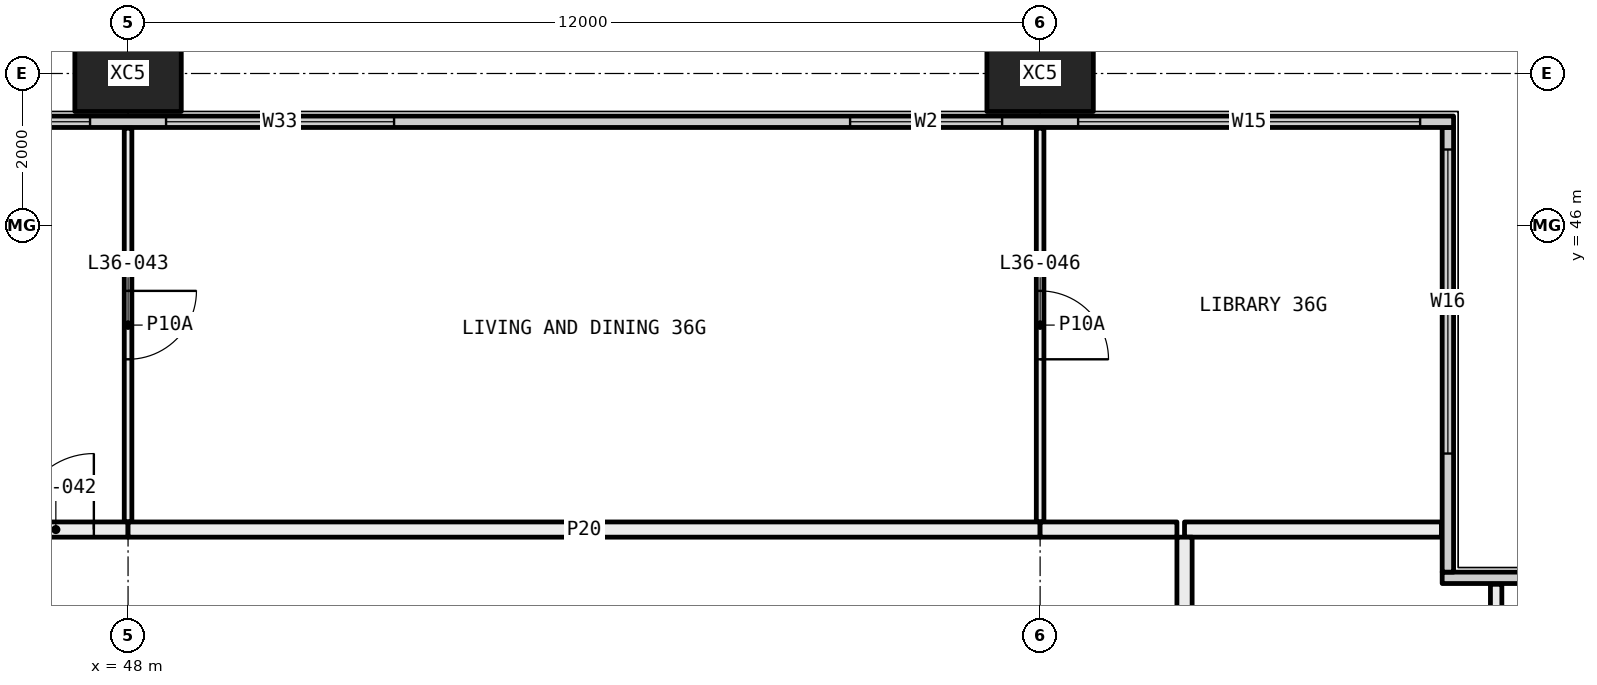
"""IFC4 building model, lengths in metres.
Left out: names, types, materials, properties, quantities, classifications, styles, units other than length and angle.
Written with IfcOpenShell. Run it as: python <this file> out.ifc"""

import sys

from ifc_helpers import new_model, si_unit, direction, frame, frame_2d, origin, origin_2d, place, context, subcontext, project, spatial, rectangle, hollow_rectangle, extrude, element, fill, save


model = new_model("IFC4")
c1 = context("Model", 3, precision=1e-05, world=origin(), true_north=direction((0.0, 1.0)))
c2 = subcontext(c1, "Body", "Model", "MODEL_VIEW")
j1 = project(units=[si_unit("LENGTHUNIT", "METRE"), si_unit("PLANEANGLEUNIT", "RADIAN")], contexts=[c1])
p1 = place(None, origin())
s1 = spatial("IfcSite", under=j1, at=p1, CompositionType="ELEMENT")
p2 = place(p1, origin())
s2 = spatial("IfcBuilding", under=s1, at=p2, CompositionType="ELEMENT")
p3 = place(p2, frame((0.0, 0.0, 138.0)))
s3 = spatial("IfcBuildingStorey", under=s2, at=p3, CompositionType="ELEMENT", Elevation=138.0)
for number, where, z_axis, x_axis in (
    (1, (48.0, 48.0, -0.4), (0.0, 0.0, 1.0), (1.0, 0.0, 0.0)),
    (2, (60.0, 48.0, -0.4), (0.0, 0.0, 1.0), (1.0, 0.0, 0.0)),
):
    element("IfcColumn", number, at=place(p3, frame(where, z_axis=z_axis, x_axis=x_axis)), inside=s3, PredefinedType="COLUMN", context=c2, shape_type="SweptSolid", body=[
        extrude(hollow_rectangle(XDim=1.4, YDim=1.0, WallThickness=0.055, at=origin_2d()), origin(), (0.0, 0.0, 1.0), 3.45),
    ])
p4 = place(p3, frame((65.29, 41.365, 0.0), z_axis=(0.0, 0.0, 1.0), x_axis=(1.0, 0.0, 0.0)))
e3 = element("IfcWall", 3, at=p4, inside=s3, PredefinedType="ELEMENTEDWALL", context=c2, shape_type="SweptSolid", body=[
    extrude(rectangle(XDim=6.15, YDim=0.15, at=frame_2d((3.075, 0.0))), origin(), (0.0, 0.0, 1.0), 3.05),
])
p5 = place(p4, frame((1.71, 0.0, 0.45)))
e4 = element("IfcOpeningElement", 4, at=p5, cuts=e3, PredefinedType="OPENING", context=c2, shape_type="SweptSolid", body=[
    extrude(rectangle(XDim=4.0, YDim=2.55, at=frame_2d((2.0, 1.275))), frame((0.0, 0.085, 0.0), z_axis=(0.0, -1.0, 0.0), x_axis=(1.0, 0.0, 0.0)), (0.0, 0.0, 1.0), 0.17),
])
p6 = place(p3, frame((65.365, 41.44, 0.0), z_axis=(0.0, 0.0, 1.0), x_axis=(0.0, 1.0, 0.0)))
e5 = element("IfcWall", 5, at=p6, inside=s3, PredefinedType="ELEMENTEDWALL", context=c2, shape_type="SweptSolid", body=[
    extrude(rectangle(XDim=5.85, YDim=0.15, at=frame_2d((2.925, 0.0))), origin(), (0.0, 0.0, 1.0), 3.05),
])
p7 = place(p6, frame((1.56, 0.0, 0.45)))
e6 = element("IfcOpeningElement", 6, at=p7, cuts=e5, PredefinedType="OPENING", context=c2, shape_type="SweptSolid", body=[
    extrude(rectangle(XDim=4.0, YDim=2.55, at=frame_2d((2.0, 1.275))), frame((0.0, 0.085, 0.0), z_axis=(0.0, -1.0, 0.0), x_axis=(1.0, 0.0, 0.0)), (0.0, 0.0, 1.0), 0.17),
])
p8 = place(p3, frame((6.56, 47.365, 0.0), z_axis=(0.0, 0.0, 1.0), x_axis=(1.0, 0.0, 0.0)))
e7 = element("IfcWall", 7, at=p8, inside=s3, PredefinedType="ELEMENTEDWALL", context=c2, shape_type="SweptSolid", body=[
    extrude(rectangle(XDim=58.88, YDim=0.15, at=frame_2d((29.44, 0.0))), origin(), (0.0, 0.0, 1.0), 3.05),
])
p9 = place(p8, frame((0.44, 0.0, 0.45)))
e8 = element("IfcOpeningElement", 8, at=p9, cuts=e7, PredefinedType="OPENING", context=c2, shape_type="SweptSolid", body=[
    extrude(rectangle(XDim=4.5, YDim=2.55, at=frame_2d((2.25, 1.275))), frame((0.0, 0.085, 0.0), z_axis=(0.0, -1.0, 0.0), x_axis=(1.0, 0.0, 0.0)), (0.0, 0.0, 1.0), 0.17),
])
p10 = place(p8, frame((5.94, 0.0, 0.45)))
e9 = element("IfcOpeningElement", 9, at=p10, cuts=e7, PredefinedType="OPENING", context=c2, shape_type="SweptSolid", body=[
    extrude(rectangle(XDim=3.0, YDim=2.55, at=frame_2d((1.5, 1.275))), frame((0.0, 0.085, 0.0), z_axis=(0.0, -1.0, 0.0), x_axis=(1.0, 0.0, 0.0)), (0.0, 0.0, 1.0), 0.17),
])
p11 = place(p8, frame((13.94, 0.0, 0.45)))
e10 = element("IfcOpeningElement", 10, at=p11, cuts=e7, PredefinedType="OPENING", context=c2, shape_type="SweptSolid", body=[
    extrude(rectangle(XDim=3.0, YDim=2.55, at=frame_2d((1.5, 1.275))), frame((0.0, 0.085, 0.0), z_axis=(0.0, -1.0, 0.0), x_axis=(1.0, 0.0, 0.0)), (0.0, 0.0, 1.0), 0.17),
])
p12 = place(p8, frame((17.94, 0.0, 0.45)))
e11 = element("IfcOpeningElement", 11, at=p12, cuts=e7, PredefinedType="OPENING", context=c2, shape_type="SweptSolid", body=[
    extrude(rectangle(XDim=3.0, YDim=2.55, at=frame_2d((1.5, 1.275))), frame((0.0, 0.085, 0.0), z_axis=(0.0, -1.0, 0.0), x_axis=(1.0, 0.0, 0.0)), (0.0, 0.0, 1.0), 0.17),
])
p13 = place(p8, frame((26.94, 0.0, 0.45)))
e12 = element("IfcOpeningElement", 12, at=p13, cuts=e7, PredefinedType="OPENING", context=c2, shape_type="SweptSolid", body=[
    extrude(rectangle(XDim=2.0, YDim=2.55, at=frame_2d((1.0, 1.275))), frame((0.0, 0.085, 0.0), z_axis=(0.0, -1.0, 0.0), x_axis=(1.0, 0.0, 0.0)), (0.0, 0.0, 1.0), 0.17),
])
p14 = place(p8, frame((29.94, 0.0, 0.45)))
e13 = element("IfcOpeningElement", 13, at=p14, cuts=e7, PredefinedType="OPENING", context=c2, shape_type="SweptSolid", body=[
    extrude(rectangle(XDim=3.0, YDim=2.55, at=frame_2d((1.5, 1.275))), frame((0.0, 0.085, 0.0), z_axis=(0.0, -1.0, 0.0), x_axis=(1.0, 0.0, 0.0)), (0.0, 0.0, 1.0), 0.17),
])
p15 = place(p8, frame((37.94, 0.0, 0.45)))
e14 = element("IfcOpeningElement", 14, at=p15, cuts=e7, PredefinedType="OPENING", context=c2, shape_type="SweptSolid", body=[
    extrude(rectangle(XDim=3.0, YDim=2.55, at=frame_2d((1.5, 1.275))), frame((0.0, 0.085, 0.0), z_axis=(0.0, -1.0, 0.0), x_axis=(1.0, 0.0, 0.0)), (0.0, 0.0, 1.0), 0.17),
])
p16 = place(p8, frame((41.94, 0.0, 0.45)))
e15 = element("IfcOpeningElement", 15, at=p16, cuts=e7, PredefinedType="OPENING", context=c2, shape_type="SweptSolid", body=[
    extrude(rectangle(XDim=3.0, YDim=2.55, at=frame_2d((1.5, 1.275))), frame((0.0, 0.085, 0.0), z_axis=(0.0, -1.0, 0.0), x_axis=(1.0, 0.0, 0.0)), (0.0, 0.0, 1.0), 0.17),
])
p17 = place(p8, frame((50.94, 0.0, 0.45)))
e16 = element("IfcOpeningElement", 16, at=p17, cuts=e7, PredefinedType="OPENING", context=c2, shape_type="SweptSolid", body=[
    extrude(rectangle(XDim=2.0, YDim=2.55, at=frame_2d((1.0, 1.275))), frame((0.0, 0.085, 0.0), z_axis=(0.0, -1.0, 0.0), x_axis=(1.0, 0.0, 0.0)), (0.0, 0.0, 1.0), 0.17),
])
p18 = place(p8, frame((53.94, 0.0, 0.45)))
e17 = element("IfcOpeningElement", 17, at=p18, cuts=e7, PredefinedType="OPENING", context=c2, shape_type="SweptSolid", body=[
    extrude(rectangle(XDim=4.5, YDim=2.55, at=frame_2d((2.25, 1.275))), frame((0.0, 0.085, 0.0), z_axis=(0.0, -1.0, 0.0), x_axis=(1.0, 0.0, 0.0)), (0.0, 0.0, 1.0), 0.17),
])
p19 = place(p3, frame((66.0, 41.28, 0.0), z_axis=(0.0, 0.0, 1.0), x_axis=(0.0, -1.0, 0.0)))
e18 = element("IfcWall", 18, at=p19, inside=s3, PredefinedType="PARTITIONING", context=c2, shape_type="SweptSolid", body=[
    extrude(rectangle(XDim=3.78, YDim=0.15, at=frame_2d((1.89, 0.0))), origin(), (0.0, 0.0, 1.0), 3.05),
])
p20 = place(p3, frame((65.28, 42.0, 0.0), z_axis=(0.0, 0.0, 1.0), x_axis=(-1.0, 0.0, 0.0)))
e19 = element("IfcWall", 19, at=p20, inside=s3, PredefinedType="PARTITIONING", context=c2, shape_type="SweptSolid", body=[
    extrude(rectangle(XDim=3.38, YDim=0.2, at=frame_2d((1.69, 0.0))), origin(), (0.0, 0.0, 1.0), 3.05),
])
p21 = place(p3, frame((61.9, 41.9, 0.0), z_axis=(0.0, 0.0, 1.0), x_axis=(0.0, -1.0, 0.0)))
e20 = element("IfcWall", 20, at=p21, inside=s3, PredefinedType="PARTITIONING", context=c2, shape_type="SweptSolid", body=[
    extrude(rectangle(XDim=4.4, YDim=0.2, at=frame_2d((2.2, 0.0))), origin(), (0.0, 0.0, 1.0), 3.05),
])
p22 = place(p3, frame((48.0, 42.1, 0.0), z_axis=(0.0, 0.0, 1.0), x_axis=(0.0, 1.0, 0.0)))
e21 = element("IfcWall", 21, at=p22, inside=s3, PredefinedType="PARTITIONING", context=c2, shape_type="SweptSolid", body=[
    extrude(rectangle(XDim=5.18, YDim=0.1, at=frame_2d((2.59, 0.0))), origin(), (0.0, 0.0, 1.0), 3.05),
])
p23 = place(p22, frame((2.14, 0.0, 0.0)))
e22 = element("IfcOpeningElement", 22, at=p23, cuts=e21, PredefinedType="OPENING", context=c2, shape_type="SweptSolid", body=[
    extrude(rectangle(XDim=0.9, YDim=2.1, at=frame_2d((0.45, 1.05))), frame((0.0, 0.06, 0.0), z_axis=(0.0, -1.0, 0.0), x_axis=(1.0, 0.0, 0.0)), (0.0, 0.0, 1.0), 0.12),
])
p24 = place(p3, frame((46.1, 42.0, 0.0), z_axis=(0.0, 0.0, 1.0), x_axis=(1.0, 0.0, 0.0)))
e23 = element("IfcWall", 23, at=p24, inside=s3, PredefinedType="PARTITIONING", context=c2, shape_type="SweptSolid", body=[
    extrude(rectangle(XDim=1.9, YDim=0.2, at=frame_2d((0.95, 0.0))), origin(), (0.0, 0.0, 1.0), 3.05),
])
p25 = place(p24, frame((0.45, 0.0, 0.0)))
e24 = element("IfcOpeningElement", 24, at=p25, cuts=e23, PredefinedType="OPENING", context=c2, shape_type="SweptSolid", body=[
    extrude(rectangle(XDim=1.0, YDim=2.1, at=frame_2d((0.5, 1.05))), frame((0.0, 0.11, 0.0), z_axis=(0.0, -1.0, 0.0), x_axis=(1.0, 0.0, 0.0)), (0.0, 0.0, 1.0), 0.22),
])
p26 = place(p3, frame((60.0, 42.1, 0.0), z_axis=(0.0, 0.0, 1.0), x_axis=(0.0, 1.0, 0.0)))
e25 = element("IfcWall", 25, at=p26, inside=s3, PredefinedType="PARTITIONING", context=c2, shape_type="SweptSolid", body=[
    extrude(rectangle(XDim=5.18, YDim=0.1, at=frame_2d((2.59, 0.0))), origin(), (0.0, 0.0, 1.0), 3.05),
])
p27 = place(p26, frame((2.14, 0.0, 0.0)))
e26 = element("IfcOpeningElement", 26, at=p27, cuts=e25, PredefinedType="OPENING", context=c2, shape_type="SweptSolid", body=[
    extrude(rectangle(XDim=0.9, YDim=2.1, at=frame_2d((0.45, 1.05))), frame((0.0, 0.06, 0.0), z_axis=(0.0, -1.0, 0.0), x_axis=(1.0, 0.0, 0.0)), (0.0, 0.0, 1.0), 0.12),
])
p28 = place(p3, frame((48.0, 42.0, 0.0), z_axis=(0.0, 0.0, 1.0), x_axis=(1.0, 0.0, 0.0)))
e27 = element("IfcWall", 27, at=p28, inside=s3, PredefinedType="PARTITIONING", context=c2, shape_type="SweptSolid", body=[
    extrude(rectangle(XDim=12.0, YDim=0.2, at=frame_2d((6.0, 0.0))), origin(), (0.0, 0.0, 1.0), 3.05),
])
p29 = place(p3, frame((60.0, 42.0, 0.0), z_axis=(0.0, 0.0, 1.0), x_axis=(1.0, 0.0, 0.0)))
e28 = element("IfcWall", 28, at=p29, inside=s3, PredefinedType="PARTITIONING", context=c2, shape_type="SweptSolid", body=[
    extrude(rectangle(XDim=1.8, YDim=0.2, at=frame_2d((0.9, 0.0))), origin(), (0.0, 0.0, 1.0), 3.05),
])
p30 = place(p7, origin())
e29 = element("IfcWindow", 29, at=p30, inside=s3, PartitioningType="SINGLE_PANEL", PredefinedType="WINDOW", context=c2, shape_type="SweptSolid", body=[
    extrude(rectangle(XDim=4.0, YDim=2.55, at=frame_2d((2.0, 1.275))), frame((0.0, 0.03, 0.0), z_axis=(0.0, -1.0, 0.0), x_axis=(1.0, 0.0, 0.0)), (0.0, 0.0, 1.0), 0.06),
])
fill(e6, e29)
p31 = place(p15, origin())
e30 = element("IfcWindow", 30, at=p31, inside=s3, PartitioningType="SINGLE_PANEL", PredefinedType="WINDOW", context=c2, shape_type="SweptSolid", body=[
    extrude(rectangle(XDim=3.0, YDim=2.55, at=frame_2d((1.5, 1.275))), frame((0.0, 0.03, 0.0), z_axis=(0.0, -1.0, 0.0), x_axis=(1.0, 0.0, 0.0)), (0.0, 0.0, 1.0), 0.06),
])
fill(e14, e30)
p32 = place(p16, origin())
e31 = element("IfcWindow", 31, at=p32, inside=s3, PartitioningType="SINGLE_PANEL", PredefinedType="WINDOW", context=c2, shape_type="SweptSolid", body=[
    extrude(rectangle(XDim=3.0, YDim=2.55, at=frame_2d((1.5, 1.275))), frame((0.0, 0.03, 0.0), z_axis=(0.0, -1.0, 0.0), x_axis=(1.0, 0.0, 0.0)), (0.0, 0.0, 1.0), 0.06),
])
fill(e15, e31)
p33 = place(p17, origin())
e32 = element("IfcWindow", 32, at=p33, inside=s3, PartitioningType="SINGLE_PANEL", PredefinedType="WINDOW", context=c2, shape_type="SweptSolid", body=[
    extrude(rectangle(XDim=2.0, YDim=2.55, at=frame_2d((1.0, 1.275))), frame((0.0, 0.03, 0.0), z_axis=(0.0, -1.0, 0.0), x_axis=(1.0, 0.0, 0.0)), (0.0, 0.0, 1.0), 0.06),
])
fill(e16, e32)
p34 = place(p18, origin())
e33 = element("IfcWindow", 33, at=p34, inside=s3, PartitioningType="SINGLE_PANEL", PredefinedType="WINDOW", context=c2, shape_type="SweptSolid", body=[
    extrude(rectangle(XDim=4.5, YDim=2.55, at=frame_2d((2.25, 1.275))), frame((0.0, 0.03, 0.0), z_axis=(0.0, -1.0, 0.0), x_axis=(1.0, 0.0, 0.0)), (0.0, 0.0, 1.0), 0.06),
])
fill(e17, e33)
p35 = place(p25, origin())
e34 = element("IfcDoor", 34, at=p35, inside=s3, OperationType="SINGLE_SWING_LEFT", PredefinedType="DOOR", context=c2, shape_type="SweptSolid", body=[
    extrude(rectangle(XDim=1.0, YDim=2.1, at=frame_2d((0.5, 1.05))), frame((0.0, 0.025, 0.0), z_axis=(0.0, -1.0, 0.0), x_axis=(1.0, 0.0, 0.0)), (0.0, 0.0, 1.0), 0.05),
])
fill(e24, e34)
p36 = place(p23, frame((0.9, 0.0, 0.0), x_axis=(-1.0, 0.0, 0.0)))
e35 = element("IfcDoor", 35, at=p36, inside=s3, OperationType="SINGLE_SWING_RIGHT", PredefinedType="DOOR", context=c2, shape_type="SweptSolid", body=[
    extrude(rectangle(XDim=0.9, YDim=2.1, at=frame_2d((0.45, 1.05))), frame((0.0, 0.025, 0.0), z_axis=(0.0, -1.0, 0.0), x_axis=(1.0, 0.0, 0.0)), (0.0, 0.0, 1.0), 0.05),
])
fill(e22, e35)
p37 = place(p27, frame((0.9, 0.0, 0.0), x_axis=(-1.0, 0.0, 0.0)))
e36 = element("IfcDoor", 36, at=p37, inside=s3, OperationType="SINGLE_SWING_LEFT", PredefinedType="DOOR", context=c2, shape_type="SweptSolid", body=[
    extrude(rectangle(XDim=0.9, YDim=2.1, at=frame_2d((0.45, 1.05))), frame((0.0, 0.025, 0.0), z_axis=(0.0, -1.0, 0.0), x_axis=(1.0, 0.0, 0.0)), (0.0, 0.0, 1.0), 0.05),
])
fill(e26, e36)
save(model, sys.argv[1])
